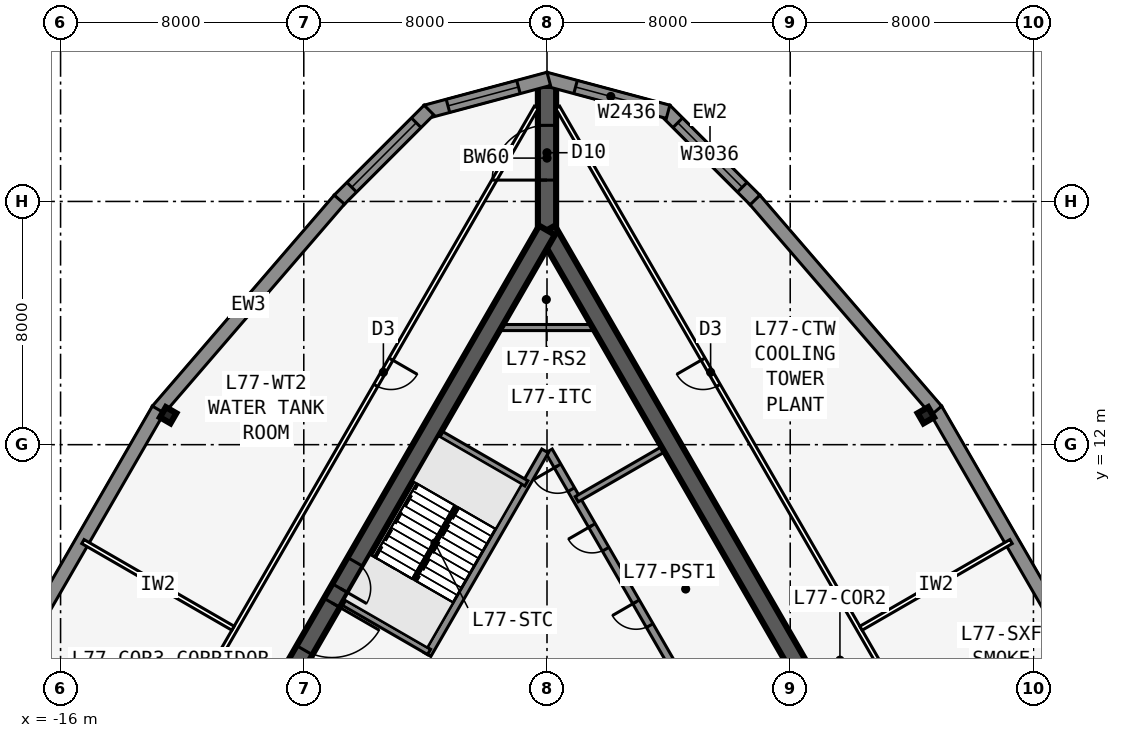
"""IFC4 building model, lengths in metres.
Left out: names, types, materials, properties, quantities, classifications, styles, units other than length and angle.
Written with IfcOpenShell. Run it as: python <this file> out.ifc"""

import sys

from ifc_helpers import new_model, si_unit, direction, frame, frame_2d, origin, origin_2d, place, context, subcontext, project, spatial, polyline, rectangle, i_section, outline, extrude, element, fill, save


model = new_model("IFC4")
c1 = context("Model", 3, precision=1e-05, world=origin(), true_north=direction((0.0, 1.0)))
c2 = subcontext(c1, "Body", "Model", "MODEL_VIEW")
j1 = project(units=[si_unit("LENGTHUNIT", "METRE"), si_unit("PLANEANGLEUNIT", "RADIAN")], contexts=[c1])
p1 = place(None, origin())
s1 = spatial("IfcSite", under=j1, at=p1, CompositionType="ELEMENT")
p2 = place(p1, origin())
s2 = spatial("IfcBuilding", under=s1, at=p2, CompositionType="ELEMENT")
p3 = place(p2, frame((0.0, 0.0, 297.8)))
s3 = spatial("IfcBuildingStorey", under=s2, at=p3, CompositionType="ELEMENT", Elevation=297.8)
p4 = place(p3, frame((16.5, -9.526, 0.0), z_axis=(0.0, 0.0, 1.0), x_axis=(-0.499999749417, 0.866025548458, 0.0)))
e1 = element("IfcWall", 1, at=p4, inside=s3, PredefinedType="SHEAR", context=c2, shape_type="SweptSolid", body=[
    extrude(rectangle(XDim=33.0, YDim=0.6, at=frame_2d((16.5, 0.0))), origin(), (0.0, 0.0, 1.0), 6.0),
])
p5 = place(p4, frame((14.15, 0.0, 0.0)))
e2 = element("IfcOpeningElement", 2, at=p5, cuts=e1, PredefinedType="OPENING", context=c2, shape_type="SweptSolid", body=[
    extrude(rectangle(XDim=1.8, YDim=2.13, at=frame_2d((0.9, 1.065))), frame((0.0, 0.31, 0.0), z_axis=(0.0, -1.0, 0.0), x_axis=(1.0, 0.0, 0.0)), (0.0, 0.0, 1.0), 0.62),
])
p6 = place(p4, frame((12.6, 0.0, 0.0)))
e3 = element("IfcOpeningElement", 3, at=p6, cuts=e1, PredefinedType="OPENING", context=c2, shape_type="SweptSolid", body=[
    extrude(rectangle(XDim=1.0, YDim=2.13, at=frame_2d((0.5, 1.065))), frame((0.0, 0.31, 0.0), z_axis=(0.0, -1.0, 0.0), x_axis=(1.0, 0.0, 0.0)), (0.0, 0.0, 1.0), 0.62),
])
p7 = place(p3, frame((5.379, 2.586, 0.0), z_axis=(0.0, 0.0, 1.0), x_axis=(-0.500001375892, 0.866024609411, 0.0)))
e4 = element("IfcWall", 4, at=p7, inside=s3, PredefinedType="SOLIDWALL", context=c2, shape_type="SweptSolid", body=[
    extrude(rectangle(XDim=10.633, YDim=0.25, at=frame_2d((5.316, 0.0))), origin(), (0.0, 0.0, 1.0), 5.75),
])
p8 = place(p7, frame((9.164, 0.0, 0.0)))
e5 = element("IfcOpeningElement", 5, at=p8, cuts=e4, PredefinedType="OPENING", context=c2, shape_type="SweptSolid", body=[
    extrude(rectangle(XDim=0.9, YDim=2.13, at=frame_2d((0.45, 1.065))), frame((0.0, 0.135, 0.0), z_axis=(0.0, -1.0, 0.0), x_axis=(1.0, 0.0, 0.0)), (0.0, 0.0, 1.0), 0.27),
])
p9 = place(p7, frame((1.1, 0.0, 0.0)))
e6 = element("IfcOpeningElement", 6, at=p9, cuts=e4, PredefinedType="OPENING", context=c2, shape_type="SweptSolid", body=[
    extrude(rectangle(XDim=0.9, YDim=2.13, at=frame_2d((0.45, 1.065))), frame((0.0, 0.135, 0.0), z_axis=(0.0, -1.0, 0.0), x_axis=(1.0, 0.0, 0.0)), (0.0, 0.0, 1.0), 0.27),
])
p10 = place(p7, frame((4.0, 0.0, 0.0)))
e7 = element("IfcOpeningElement", 7, at=p10, cuts=e4, PredefinedType="OPENING", context=c2, shape_type="SweptSolid", body=[
    extrude(rectangle(XDim=0.9, YDim=2.13, at=frame_2d((0.45, 1.065))), frame((0.0, 0.135, 0.0), z_axis=(0.0, -1.0, 0.0), x_axis=(1.0, 0.0, 0.0)), (0.0, 0.0, 1.0), 0.27),
])
p11 = place(p7, frame((6.9, 0.0, 0.0)))
e8 = element("IfcOpeningElement", 8, at=p11, cuts=e4, PredefinedType="OPENING", context=c2, shape_type="SweptSolid", body=[
    extrude(rectangle(XDim=0.9, YDim=2.13, at=frame_2d((0.45, 1.065))), frame((0.0, 0.135, 0.0), z_axis=(0.0, -1.0, 0.0), x_axis=(1.0, 0.0, 0.0)), (0.0, 0.0, 1.0), 0.27),
])
p12 = place(p3, frame((0.979, 10.207, 0.0), z_axis=(0.0, 0.0, 1.0), x_axis=(0.866027924134, 0.499995634601, 0.0)))
e9 = element("IfcWall", 9, at=p12, inside=s3, PredefinedType="SOLIDWALL", context=c2, shape_type="SweptSolid", body=[
    extrude(rectangle(XDim=3.275, YDim=0.2, at=frame_2d((1.637, 0.0))), origin(), (0.0, 0.0, 1.0), 5.75),
])
p13 = place(p3, frame((0.0, 19.052, 0.0), z_axis=(0.0, 0.0, 1.0), x_axis=(-0.499999749417, -0.866025548458, 0.0)))
e10 = element("IfcWall", 10, at=p13, inside=s3, PredefinedType="SHEAR", context=c2, shape_type="SweptSolid", body=[
    extrude(rectangle(XDim=33.0, YDim=0.6, at=frame_2d((16.5, 0.0))), origin(), (0.0, 0.0, 1.0), 6.0),
])
p14 = place(p13, frame((14.15, 0.0, 0.0)))
e11 = element("IfcOpeningElement", 11, at=p14, cuts=e10, PredefinedType="OPENING", context=c2, shape_type="SweptSolid", body=[
    extrude(rectangle(XDim=1.8, YDim=2.13, at=frame_2d((0.9, 1.065))), frame((0.0, 0.31, 0.0), z_axis=(0.0, -1.0, 0.0), x_axis=(1.0, 0.0, 0.0)), (0.0, 0.0, 1.0), 0.62),
])
p15 = place(p13, frame((12.6, 0.0, 0.0)))
e12 = element("IfcOpeningElement", 12, at=p15, cuts=e10, PredefinedType="OPENING", context=c2, shape_type="SweptSolid", body=[
    extrude(rectangle(XDim=1.0, YDim=2.13, at=frame_2d((0.5, 1.065))), frame((0.0, 0.31, 0.0), z_axis=(0.0, -1.0, 0.0), x_axis=(1.0, 0.0, 0.0)), (0.0, 0.0, 1.0), 0.62),
])
p16 = place(p3, frame((-0.062, 11.794, 0.0), z_axis=(0.0, 0.0, 1.0), x_axis=(-0.500006680225, -0.86602154692, 0.0)))
e13 = element("IfcWall", 13, at=p16, inside=s3, PredefinedType="SOLIDWALL", context=c2, shape_type="SweptSolid", body=[
    extrude(rectangle(XDim=7.733, YDim=0.25, at=frame_2d((3.866, 0.0))), origin(), (0.0, 0.0, 1.0), 5.75),
])
for number, where, z_axis, x_axis in (
    (14, (-0.679, 10.727, 0.0), (0.0, 0.0, 1.0), (-0.866, 0.5, 0.0)),
    (15, (-3.879, 5.184, 0.0), (0.0, 0.0, 1.0), (-0.866, 0.5, 0.0)),
    (16, (-4.979, 3.279, 0.0), (0.0, 0.0, 1.0), (-0.866, 0.5, 0.0)),
):
    element("IfcWall", number, at=place(p3, frame(where, z_axis=z_axis, x_axis=x_axis)), inside=s3, PredefinedType="SOLIDWALL", context=c2, shape_type="SweptSolid", body=[
        extrude(rectangle(XDim=3.275, YDim=0.2, at=frame_2d((1.637, 0.0))), origin(), (0.0, 0.0, 1.0), 5.75),
    ])
p17 = place(p3, frame((0.0, 19.052, 0.0), z_axis=(0.0, 0.0, 1.0), x_axis=(0.0, 1.0, 0.0)))
e17 = element("IfcWall", 17, at=p17, inside=s3, PredefinedType="SHEAR", context=c2, shape_type="SweptSolid", body=[
    extrude(rectangle(XDim=4.746, YDim=0.6, at=frame_2d((2.373, 0.0))), origin(), (0.0, 0.0, 1.0), 6.0),
])
p18 = place(p17, frame((1.65, 0.0, 0.0)))
e18 = element("IfcOpeningElement", 18, at=p18, cuts=e17, PredefinedType="OPENING", context=c2, shape_type="SweptSolid", body=[
    extrude(rectangle(XDim=1.8, YDim=2.13, at=frame_2d((0.9, 1.065))), frame((0.0, 0.31, 0.0), z_axis=(0.0, -1.0, 0.0), x_axis=(1.0, 0.0, 0.0)), (0.0, 0.0, 1.0), 0.62),
])
for number, where, z_axis, x_axis in (
    (19, (12.461, 12.968, 0.0), (0.0, 0.0, 1.0), (0.866, 0.5, 0.0)),
    (20, (-12.461, 12.968, 0.0), (0.0, 0.0, 1.0), (-0.866, 0.5, 0.0)),
):
    element("IfcColumn", number, at=place(p3, frame(where, z_axis=z_axis, x_axis=x_axis)), inside=s3, PredefinedType="COLUMN", context=c2, shape_type="SweptSolid", body=[
        extrude(i_section(OverallWidth=0.399, OverallDepth=0.386, WebThickness=0.021, FlangeThickness=0.033, at=origin_2d()), origin(), (0.0, 0.0, 1.0), 6.0),
    ])
p19 = place(p3, frame((17.786, 4.495, 0.0), z_axis=(0.0, 0.0, 1.0), x_axis=(-0.500004234368, 0.866022959057, 0.0)))
e21 = element("IfcWall", 21, at=p19, inside=s3, PredefinedType="SOLIDWALL", context=c2, shape_type="SweptSolid", body=[
    extrude(outline(polyline([(0.0, 0.0), (10.0, 0.0), (10.0, 5.75), (0.0, 5.75), (0.0, 0.0)]), holes=[polyline([(7.25, 2.875), (7.173, 3.457), (6.948, 4.0), (6.591, 4.466), (6.125, 4.823), (5.582, 5.048), (5.0, 5.125), (4.417, 5.048), (3.875, 4.823), (3.409, 4.466), (3.052, 4.0), (2.827, 3.457), (2.75, 2.875), (2.827, 2.293), (3.052, 1.75), (3.409, 1.284), (3.875, 0.926), (4.417, 0.702), (5.0, 0.625), (5.582, 0.702), (6.125, 0.926), (6.591, 1.284), (6.948, 1.75), (7.173, 2.293), (7.25, 2.875)])]), frame((0.0, 0.225, 0.0), z_axis=(0.0, -1.0, 0.0), x_axis=(1.0, 0.0, 0.0)), (0.0, 0.0, 1.0), 0.45),
])
p20 = place(p3, frame((12.811, 13.121, 0.0), z_axis=(0.0, 0.0, 1.0), x_axis=(-0.652869504194, 0.757470402388, 0.0)))
e22 = element("IfcWall", 22, at=p20, inside=s3, PredefinedType="SOLIDWALL", context=c2, shape_type="SweptSolid", body=[
    extrude(outline(polyline([(0.0, 0.0), (9.161, 0.0), (9.161, 5.75), (0.0, 5.75), (0.0, 0.0)]), holes=[polyline([(6.831, 2.875), (6.754, 3.457), (6.529, 4.0), (6.171, 4.466), (5.706, 4.823), (5.163, 5.048), (4.581, 5.125), (3.998, 5.048), (3.456, 4.823), (2.99, 4.466), (2.632, 4.0), (2.407, 3.457), (2.331, 2.875), (2.407, 2.293), (2.632, 1.75), (2.99, 1.284), (3.456, 0.926), (3.998, 0.702), (4.581, 0.625), (5.163, 0.702), (5.706, 0.926), (6.171, 1.284), (6.529, 1.75), (6.754, 2.293), (6.831, 2.875)])]), frame((0.0, 0.225, 0.0), z_axis=(0.0, -1.0, 0.0), x_axis=(1.0, 0.0, 0.0)), (0.0, 0.0, 1.0), 0.45),
])
p21 = place(p3, frame((6.841, 20.048, 0.0), z_axis=(0.0, 0.0, 1.0), x_axis=(-0.707106781187, 0.707106781187, 0.0)))
e23 = element("IfcWall", 23, at=p21, inside=s3, PredefinedType="SOLIDWALL", context=c2, shape_type="SweptSolid", body=[
    extrude(rectangle(XDim=4.184, YDim=0.45, at=frame_2d((2.092, 0.0))), origin(), (0.0, 0.0, 1.0), 5.75),
])
p22 = place(p21, frame((0.592, 0.0, 0.9)))
e24 = element("IfcOpeningElement", 24, at=p22, cuts=e23, PredefinedType="OPENING", context=c2, shape_type="SweptSolid", body=[
    extrude(rectangle(XDim=3.0, YDim=3.6, at=frame_2d((1.5, 1.8))), frame((0.0, 0.235, 0.0), z_axis=(0.0, -1.0, 0.0), x_axis=(1.0, 0.0, 0.0)), (0.0, 0.0, 1.0), 0.47),
])
p23 = place(p3, frame((3.983, 22.948, 0.0), z_axis=(0.0, 0.0, 1.0), x_axis=(-0.965920442324, 0.258839137498, 0.0)))
e25 = element("IfcWall", 25, at=p23, inside=s3, PredefinedType="SOLIDWALL", context=c2, shape_type="SweptSolid", body=[
    extrude(outline(polyline([(4.184, 0.225), (4.124, 0.225), (3.778, 0.132), (3.753, 0.225), (0.0, 0.225), (0.0, -0.225), (4.184, -0.225), (4.184, 0.225)])), origin(), (0.0, 0.0, 1.0), 5.75),
])
p24 = place(p23, frame((0.751, 0.0, 0.9)))
e26 = element("IfcOpeningElement", 26, at=p24, cuts=e25, PredefinedType="OPENING", context=c2, shape_type="SweptSolid", body=[
    extrude(rectangle(XDim=2.4, YDim=3.6, at=frame_2d((1.2, 1.8))), frame((0.0, 0.235, 0.0), z_axis=(0.0, -1.0, 0.0), x_axis=(1.0, 0.0, 0.0)), (0.0, 0.0, 1.0), 0.47),
])
p25 = place(p3, frame((0.058, 24.031, 0.0), z_axis=(0.0, 0.0, 1.0), x_axis=(-0.965920442324, -0.258839137498, 0.0)))
e27 = element("IfcWall", 27, at=p25, inside=s3, PredefinedType="SOLIDWALL", context=c2, shape_type="SweptSolid", body=[
    extrude(outline(polyline([(4.184, 0.225), (0.431, 0.225), (0.406, 0.132), (0.06, 0.225), (0.0, 0.225), (0.0, -0.225), (4.184, -0.225), (4.184, 0.225)])), origin(), (0.0, 0.0, 1.0), 5.75),
])
p26 = place(p25, frame((1.033, 0.0, 0.9)))
e28 = element("IfcOpeningElement", 28, at=p26, cuts=e27, PredefinedType="OPENING", context=c2, shape_type="SweptSolid", body=[
    extrude(rectangle(XDim=2.4, YDim=3.6, at=frame_2d((1.2, 1.8))), frame((0.0, 0.235, 0.0), z_axis=(0.0, -1.0, 0.0), x_axis=(1.0, 0.0, 0.0)), (0.0, 0.0, 1.0), 0.47),
])
p27 = place(p3, frame((-3.882, 23.007, 0.0), z_axis=(0.0, 0.0, 1.0), x_axis=(-0.707106781187, -0.707106781187, 0.0)))
e29 = element("IfcWall", 29, at=p27, inside=s3, PredefinedType="SOLIDWALL", context=c2, shape_type="SweptSolid", body=[
    extrude(rectangle(XDim=4.184, YDim=0.45, at=frame_2d((2.092, 0.0))), origin(), (0.0, 0.0, 1.0), 5.75),
])
p28 = place(p27, frame((0.592, 0.0, 0.9)))
e30 = element("IfcOpeningElement", 30, at=p28, cuts=e29, PredefinedType="OPENING", context=c2, shape_type="SweptSolid", body=[
    extrude(rectangle(XDim=3.0, YDim=3.6, at=frame_2d((1.5, 1.8))), frame((0.0, 0.235, 0.0), z_axis=(0.0, -1.0, 0.0), x_axis=(1.0, 0.0, 0.0)), (0.0, 0.0, 1.0), 0.47),
])
p29 = place(p3, frame((-6.83, 20.06, 0.0), z_axis=(0.0, 0.0, 1.0), x_axis=(-0.652869504194, -0.757470402388, 0.0)))
e31 = element("IfcWall", 31, at=p29, inside=s3, PredefinedType="SOLIDWALL", context=c2, shape_type="SweptSolid", body=[
    extrude(outline(polyline([(0.0, 0.0), (9.161, 0.0), (9.161, 5.75), (0.0, 5.75), (0.0, 0.0)]), holes=[polyline([(6.831, 2.875), (6.754, 3.457), (6.529, 4.0), (6.171, 4.466), (5.706, 4.823), (5.163, 5.048), (4.581, 5.125), (3.998, 5.048), (3.456, 4.823), (2.99, 4.466), (2.632, 4.0), (2.407, 3.457), (2.331, 2.875), (2.407, 2.293), (2.632, 1.75), (2.99, 1.284), (3.456, 0.926), (3.998, 0.702), (4.581, 0.625), (5.163, 0.702), (5.706, 0.926), (6.171, 1.284), (6.529, 1.75), (6.754, 2.293), (6.831, 2.875)])]), frame((0.0, 0.225, 0.0), z_axis=(0.0, -1.0, 0.0), x_axis=(1.0, 0.0, 0.0)), (0.0, 0.0, 1.0), 0.45),
])
p30 = place(p3, frame((-12.786, 13.156, 0.0), z_axis=(0.0, 0.0, 1.0), x_axis=(-0.500004234368, -0.866022959057, 0.0)))
e32 = element("IfcWall", 32, at=p30, inside=s3, PredefinedType="SOLIDWALL", context=c2, shape_type="SweptSolid", body=[
    extrude(outline(polyline([(0.0, 0.0), (10.0, 0.0), (10.0, 5.75), (0.0, 5.75), (0.0, 0.0)]), holes=[polyline([(7.25, 2.875), (7.173, 3.457), (6.948, 4.0), (6.591, 4.466), (6.125, 4.823), (5.582, 5.048), (5.0, 5.125), (4.417, 5.048), (3.875, 4.823), (3.409, 4.466), (3.052, 4.0), (2.827, 3.457), (2.75, 2.875), (2.827, 2.293), (3.052, 1.75), (3.409, 1.284), (3.875, 0.926), (4.417, 0.702), (5.0, 0.625), (5.582, 0.702), (6.125, 0.926), (6.591, 1.284), (6.948, 1.75), (7.173, 2.293), (7.25, 2.875)])]), frame((0.0, 0.225, 0.0), z_axis=(0.0, -1.0, 0.0), x_axis=(1.0, 0.0, 0.0)), (0.0, 0.0, 1.0), 0.45),
])
p31 = place(p3, frame((20.177, -11.245, 0.0), z_axis=(0.0, 0.0, 1.0), x_axis=(-0.499998875317, 0.866026053119, 0.0)))
e33 = element("IfcWall", 33, at=p31, inside=s3, PredefinedType="PARTITIONING", context=c2, shape_type="SweptSolid", body=[
    extrude(rectangle(XDim=39.654, YDim=0.15, at=frame_2d((19.827, 0.0))), origin(), (0.0, 0.0, 1.0), 5.75),
])
p32 = place(p31, frame((9.563, 0.0, 0.0)))
e34 = element("IfcOpeningElement", 34, at=p32, cuts=e33, PredefinedType="OPENING", context=c2, shape_type="SweptSolid", body=[
    extrude(rectangle(XDim=1.0, YDim=2.13, at=frame_2d((0.5, 1.065))), frame((0.0, 0.085, 0.0), z_axis=(0.0, -1.0, 0.0), x_axis=(1.0, 0.0, 0.0)), (0.0, 0.0, 1.0), 0.17),
])
p33 = place(p31, frame((29.091, 0.0, 0.0)))
e35 = element("IfcOpeningElement", 35, at=p33, cuts=e33, PredefinedType="OPENING", context=c2, shape_type="SweptSolid", body=[
    extrude(rectangle(XDim=1.0, YDim=2.13, at=frame_2d((0.5, 1.065))), frame((0.0, 0.085, 0.0), z_axis=(0.0, -1.0, 0.0), x_axis=(1.0, 0.0, 0.0)), (0.0, 0.0, 1.0), 0.17),
])
p34 = place(p3, frame((10.329, 5.963, 0.0), z_axis=(0.0, 0.0, 1.0), x_axis=(0.86601224135, 0.500022797313, 0.0)))
e36 = element("IfcWall", 36, at=p34, inside=s3, PredefinedType="PARTITIONING", context=c2, shape_type="SweptSolid", body=[
    extrude(rectangle(XDim=5.699, YDim=0.15, at=frame_2d((2.85, 0.0))), origin(), (0.0, 0.0, 1.0), 4.708),
])
p35 = place(p3, frame((-0.35, 23.096, 0.0), z_axis=(0.0, 0.0, 1.0), x_axis=(-0.499998875317, -0.866026053119, 0.0)))
e37 = element("IfcWall", 37, at=p35, inside=s3, PredefinedType="PARTITIONING", context=c2, shape_type="SweptSolid", body=[
    extrude(rectangle(XDim=39.654, YDim=0.15, at=frame_2d((19.827, 0.0))), origin(), (0.0, 0.0, 1.0), 5.75),
])
p36 = place(p35, frame((9.563, 0.0, 0.0)))
e38 = element("IfcOpeningElement", 38, at=p36, cuts=e37, PredefinedType="OPENING", context=c2, shape_type="SweptSolid", body=[
    extrude(rectangle(XDim=1.0, YDim=2.13, at=frame_2d((0.5, 1.065))), frame((0.0, 0.085, 0.0), z_axis=(0.0, -1.0, 0.0), x_axis=(1.0, 0.0, 0.0)), (0.0, 0.0, 1.0), 0.17),
])
p37 = place(p35, frame((29.091, 0.0, 0.0)))
e39 = element("IfcOpeningElement", 39, at=p37, cuts=e37, PredefinedType="OPENING", context=c2, shape_type="SweptSolid", body=[
    extrude(rectangle(XDim=1.0, YDim=2.13, at=frame_2d((0.5, 1.065))), frame((0.0, 0.085, 0.0), z_axis=(0.0, -1.0, 0.0), x_axis=(1.0, 0.0, 0.0)), (0.0, 0.0, 1.0), 0.17),
])
p38 = place(p3, frame((-10.329, 5.963, 0.0), z_axis=(0.0, 0.0, 1.0), x_axis=(-0.86601224135, 0.500022797313, 0.0)))
e40 = element("IfcWall", 40, at=p38, inside=s3, PredefinedType="PARTITIONING", context=c2, shape_type="SweptSolid", body=[
    extrude(rectangle(XDim=5.699, YDim=0.15, at=frame_2d((2.85, 0.0))), origin(), (0.0, 0.0, 1.0), 4.708),
])
p39 = place(p3, frame((-1.501, 15.853, 0.0), z_axis=(0.0, 0.0, 1.0), x_axis=(1.0, 0.0, 0.0)))
e41 = element("IfcWall", 41, at=p39, inside=s3, PredefinedType="SOLIDWALL", context=c2, shape_type="SweptSolid", body=[
    extrude(rectangle(XDim=3.002, YDim=0.2, at=frame_2d((1.501, 0.0))), origin(), (0.0, 0.0, 1.0), 5.75),
])
p40 = place(p3, frame((-2.988, 9.978, 0.0), z_axis=(0.0, 0.0, 1.0), x_axis=(-0.499992232847, -0.866029888106, 0.0)))
e42 = element("IfcWall", 42, at=p40, inside=s3, PredefinedType="SOLIDWALL", context=c2, shape_type="SweptSolid", body=[
    extrude(rectangle(XDim=2.794, YDim=0.1, at=frame_2d((1.397, 0.0))), origin(), (0.0, 0.0, 1.0), 6.0),
])
p41 = place(p22, origin())
e43 = element("IfcWindow", 43, at=p41, inside=s3, PartitioningType="SINGLE_PANEL", PredefinedType="WINDOW", context=c2, shape_type="SweptSolid", body=[
    extrude(rectangle(XDim=3.0, YDim=3.6, at=frame_2d((1.5, 1.8))), frame((0.0, 0.03, 0.0), z_axis=(0.0, -1.0, 0.0), x_axis=(1.0, 0.0, 0.0)), (0.0, 0.0, 1.0), 0.06),
])
fill(e24, e43)
p42 = place(p24, origin())
e44 = element("IfcWindow", 44, at=p42, inside=s3, PartitioningType="SINGLE_PANEL", PredefinedType="WINDOW", context=c2, shape_type="SweptSolid", body=[
    extrude(rectangle(XDim=2.4, YDim=3.6, at=frame_2d((1.2, 1.8))), frame((0.0, 0.03, 0.0), z_axis=(0.0, -1.0, 0.0), x_axis=(1.0, 0.0, 0.0)), (0.0, 0.0, 1.0), 0.06),
])
fill(e26, e44)
p43 = place(p26, origin())
e45 = element("IfcWindow", 45, at=p43, inside=s3, PartitioningType="SINGLE_PANEL", PredefinedType="WINDOW", context=c2, shape_type="SweptSolid", body=[
    extrude(rectangle(XDim=2.4, YDim=3.6, at=frame_2d((1.2, 1.8))), frame((0.0, 0.03, 0.0), z_axis=(0.0, -1.0, 0.0), x_axis=(1.0, 0.0, 0.0)), (0.0, 0.0, 1.0), 0.06),
])
fill(e28, e45)
p44 = place(p28, origin())
e46 = element("IfcWindow", 46, at=p44, inside=s3, PartitioningType="SINGLE_PANEL", PredefinedType="WINDOW", context=c2, shape_type="SweptSolid", body=[
    extrude(rectangle(XDim=3.0, YDim=3.6, at=frame_2d((1.5, 1.8))), frame((0.0, 0.03, 0.0), z_axis=(0.0, -1.0, 0.0), x_axis=(1.0, 0.0, 0.0)), (0.0, 0.0, 1.0), 0.06),
])
fill(e30, e46)
p45 = place(p33, origin())
e47 = element("IfcDoor", 47, at=p45, inside=s3, OperationType="SINGLE_SWING_RIGHT", PredefinedType="DOOR", context=c2, shape_type="SweptSolid", body=[
    extrude(rectangle(XDim=1.0, YDim=2.13, at=frame_2d((0.5, 1.065))), frame((0.0, 0.025, 0.0), z_axis=(0.0, -1.0, 0.0), x_axis=(1.0, 0.0, 0.0)), (0.0, 0.0, 1.0), 0.05),
])
fill(e35, e47)
p46 = place(p36, origin())
e48 = element("IfcDoor", 48, at=p46, inside=s3, OperationType="SINGLE_SWING_LEFT", PredefinedType="DOOR", context=c2, shape_type="SweptSolid", body=[
    extrude(rectangle(XDim=1.0, YDim=2.13, at=frame_2d((0.5, 1.065))), frame((0.0, 0.025, 0.0), z_axis=(0.0, -1.0, 0.0), x_axis=(1.0, 0.0, 0.0)), (0.0, 0.0, 1.0), 0.05),
])
fill(e38, e48)
p47 = place(p14, origin())
e49 = element("IfcDoor", 49, at=p47, inside=s3, OperationType="DOUBLE_DOOR_SINGLE_SWING", PredefinedType="DOOR", context=c2, shape_type="SweptSolid", body=[
    extrude(rectangle(XDim=1.8, YDim=2.13, at=frame_2d((0.9, 1.065))), frame((0.0, 0.025, 0.0), z_axis=(0.0, -1.0, 0.0), x_axis=(1.0, 0.0, 0.0)), (0.0, 0.0, 1.0), 0.05),
])
fill(e11, e49)
p48 = place(p15, origin())
e50 = element("IfcDoor", 50, at=p48, inside=s3, OperationType="SINGLE_SWING_RIGHT", PredefinedType="DOOR", context=c2, shape_type="SweptSolid", body=[
    extrude(rectangle(XDim=1.0, YDim=2.13, at=frame_2d((0.5, 1.065))), frame((0.0, 0.025, 0.0), z_axis=(0.0, -1.0, 0.0), x_axis=(1.0, 0.0, 0.0)), (0.0, 0.0, 1.0), 0.05),
])
fill(e12, e50)
p49 = place(p18, origin())
e51 = element("IfcDoor", 51, at=p49, inside=s3, OperationType="DOUBLE_DOOR_DOUBLE_SWING", PredefinedType="DOOR", context=c2, shape_type="SweptSolid", body=[
    extrude(rectangle(XDim=1.8, YDim=2.13, at=frame_2d((0.9, 1.065))), frame((0.0, 0.025, 0.0), z_axis=(0.0, -1.0, 0.0), x_axis=(1.0, 0.0, 0.0)), (0.0, 0.0, 1.0), 0.05),
])
fill(e18, e51)
p50 = place(p8, origin())
e52 = element("IfcDoor", 52, at=p50, inside=s3, OperationType="SINGLE_SWING_RIGHT", PredefinedType="DOOR", context=c2, shape_type="SweptSolid", body=[
    extrude(rectangle(XDim=0.9, YDim=2.13, at=frame_2d((0.45, 1.065))), frame((0.0, 0.025, 0.0), z_axis=(0.0, -1.0, 0.0), x_axis=(1.0, 0.0, 0.0)), (0.0, 0.0, 1.0), 0.05),
])
fill(e5, e52)
p51 = place(p10, origin())
e53 = element("IfcDoor", 53, at=p51, inside=s3, OperationType="SINGLE_SWING_RIGHT", PredefinedType="DOOR", context=c2, shape_type="SweptSolid", body=[
    extrude(rectangle(XDim=0.9, YDim=2.13, at=frame_2d((0.45, 1.065))), frame((0.0, 0.025, 0.0), z_axis=(0.0, -1.0, 0.0), x_axis=(1.0, 0.0, 0.0)), (0.0, 0.0, 1.0), 0.05),
])
fill(e7, e53)
p52 = place(p11, origin())
e54 = element("IfcDoor", 54, at=p52, inside=s3, OperationType="SINGLE_SWING_RIGHT", PredefinedType="DOOR", context=c2, shape_type="SweptSolid", body=[
    extrude(rectangle(XDim=0.9, YDim=2.13, at=frame_2d((0.45, 1.065))), frame((0.0, 0.025, 0.0), z_axis=(0.0, -1.0, 0.0), x_axis=(1.0, 0.0, 0.0)), (0.0, 0.0, 1.0), 0.05),
])
fill(e8, e54)
save(model, sys.argv[1])
